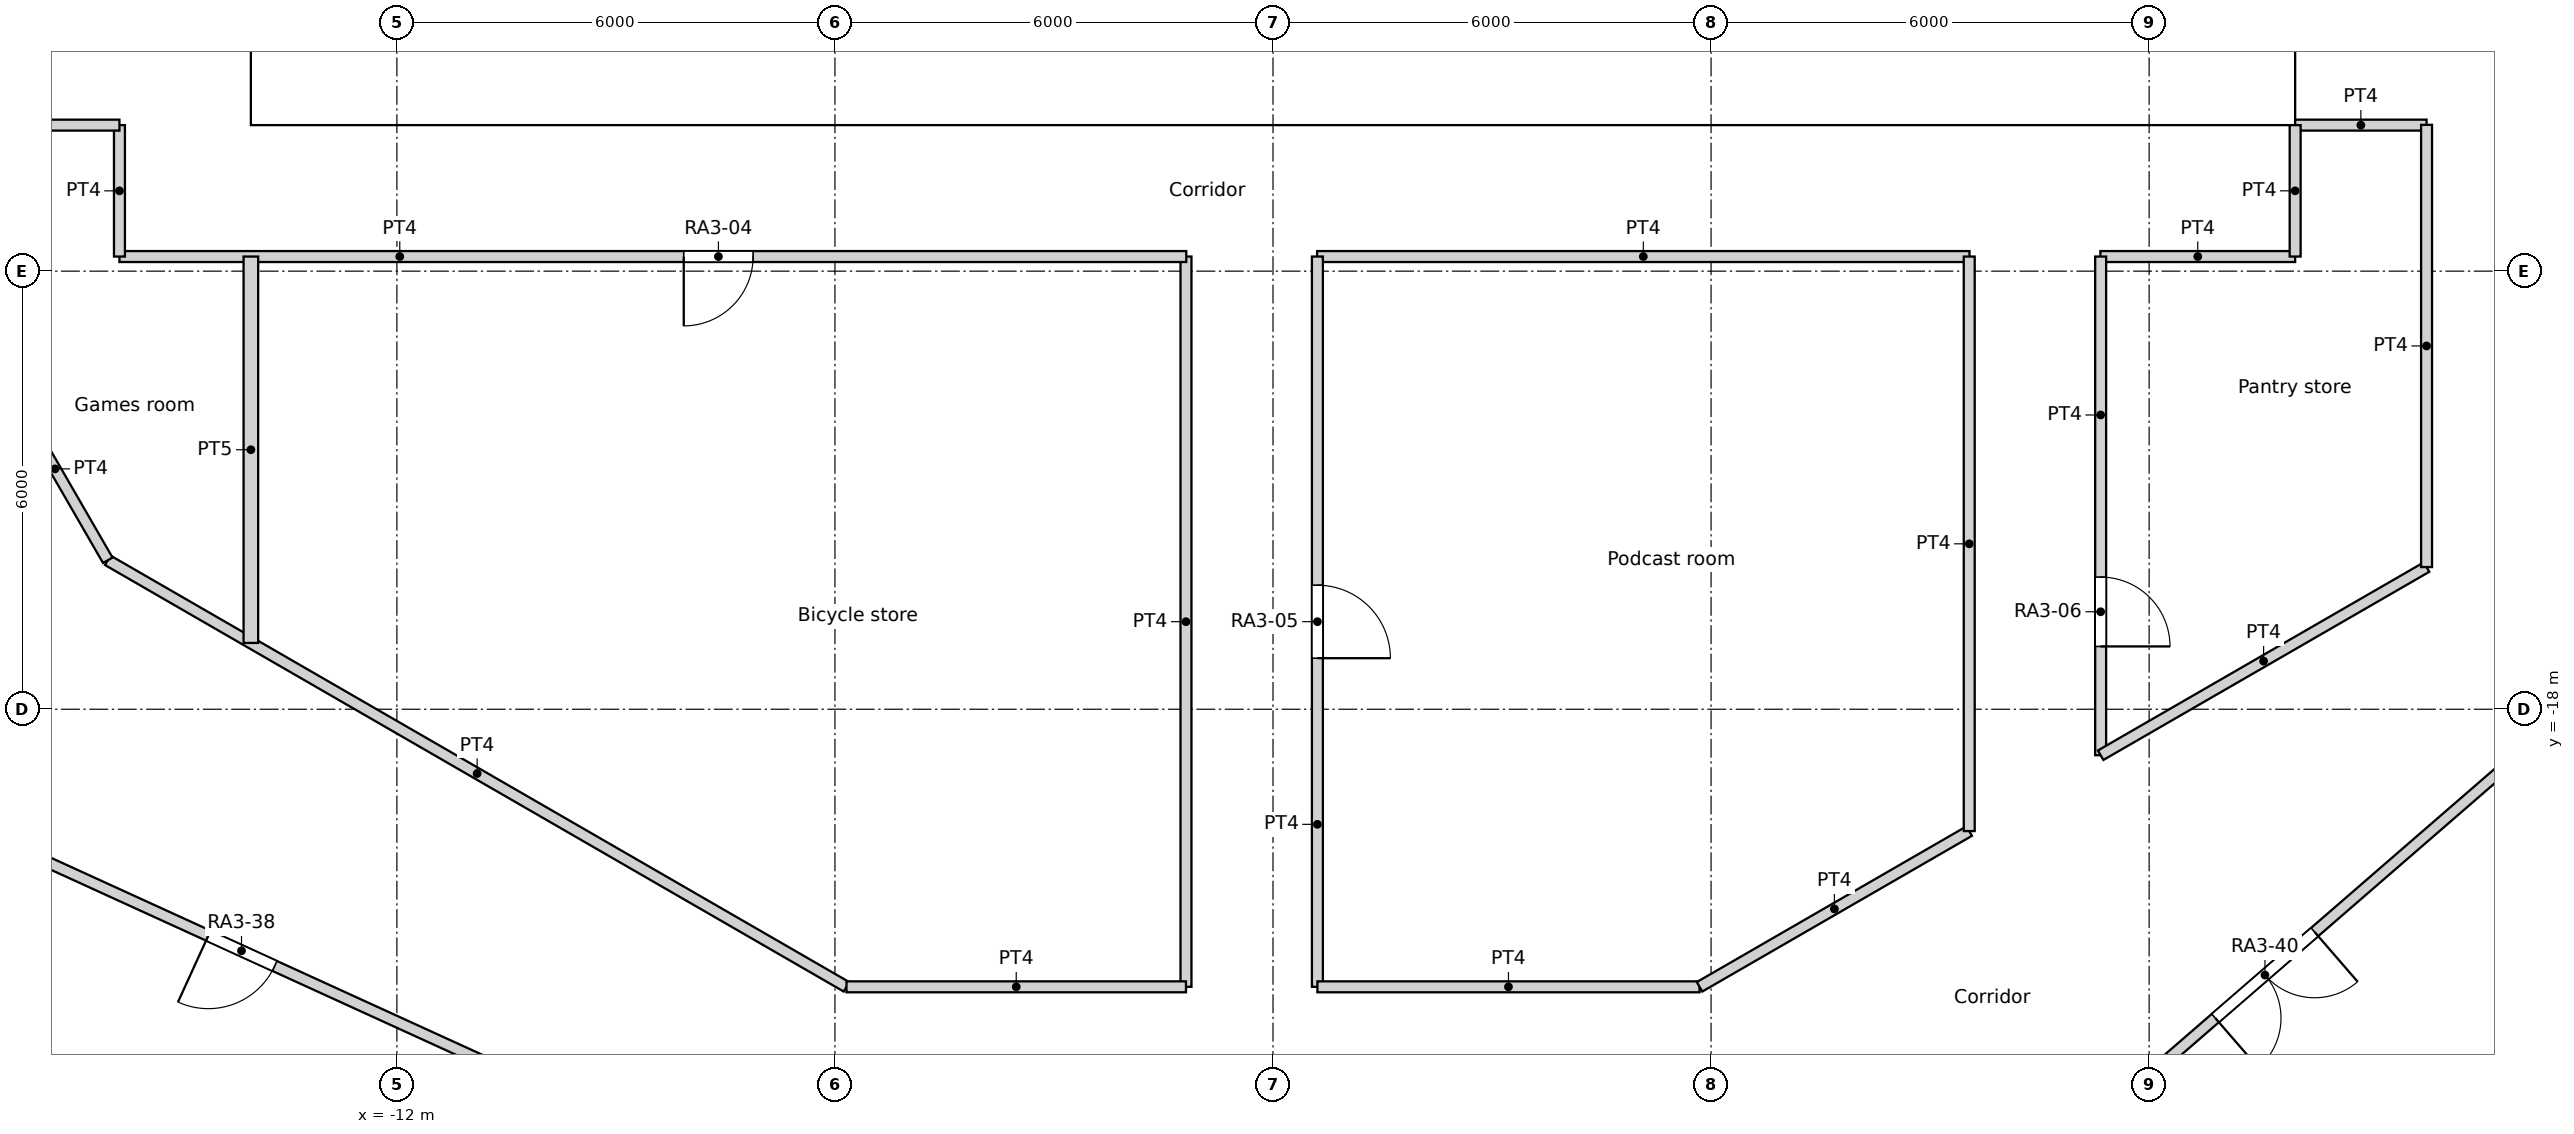
"""IFC4 building model, lengths in metres.
Left out: names, types, materials, properties, quantities, classifications, styles, units other than length and angle.
Written with IfcOpenShell. Run it as: python <this file> out.ifc"""

import sys

from ifc_helpers import new_model, si_unit, direction, frame, frame_2d, origin, origin_2d, place, context, subcontext, project, spatial, rectangle, circle, extrude, element, fill, save


model = new_model("IFC4")
c1 = context("Model", 3, precision=1e-05, world=origin(), true_north=direction((0.0, 1.0)))
c2 = subcontext(c1, "Body", "Model", "MODEL_VIEW")
j1 = project(units=[si_unit("LENGTHUNIT", "METRE"), si_unit("PLANEANGLEUNIT", "RADIAN")], contexts=[c1])
p1 = place(None, origin())
s1 = spatial("IfcSite", under=j1, at=p1, CompositionType="ELEMENT")
p2 = place(p1, origin())
s2 = spatial("IfcBuilding", under=s1, at=p2, CompositionType="ELEMENT")
p3 = place(p2, frame((0.0, 0.0, 49.8)))
s3 = spatial("IfcBuildingStorey", under=s2, at=p3, CompositionType="ELEMENT", Elevation=49.8)
for number, where, z_axis, x_axis in (
    (1, (-16.846, -17.855, 0.0), (0.0, 0.0, 1.0), (1.0, 0.0, 0.0)),
    (2, (-12.274, -21.259, 0.0), (0.0, 0.0, 1.0), (1.0, 0.0, 0.0)),
    (3, (9.723, -22.54, 0.0), (0.0, 0.0, 1.0), (1.0, 0.0, 0.0)),
    (4, (14.659, -19.69, 0.0), (0.0, 0.0, 1.0), (1.0, 0.0, 0.0)),
):
    element("IfcColumn", number, at=place(p3, frame(where, z_axis=z_axis, x_axis=x_axis)), inside=s3, PredefinedType="COLUMN", context=c2, shape_type="SweptSolid", body=[
        extrude(circle(Radius=0.75, at=origin_2d()), origin(), (0.0, 0.0, 1.0), 3.6),
    ])
for number, where, z_axis, x_axis in (
    (5, (-13.798, -12.802, 0.0), (0.0, 0.0, 1.0), (1.0, 0.0, 0.0)),
    (6, (-9.411, -16.301, 0.0), (0.0, 0.0, 1.0), (1.0, 0.0, 0.0)),
    (7, (-4.188, -18.35, 0.0), (0.0, 0.0, 1.0), (1.0, 0.0, 0.0)),
    (8, (1.406, -18.77, 0.0), (0.0, 0.0, 1.0), (1.0, 0.0, 0.0)),
    (9, (6.876, -17.521, 0.0), (0.0, 0.0, 1.0), (1.0, 0.0, 0.0)),
    (10, (11.735, -14.716, 0.0), (0.0, 0.0, 1.0), (1.0, 0.0, 0.0)),
    (11, (15.552, -10.603, 0.0), (0.0, 0.0, 1.0), (1.0, 0.0, 0.0)),
):
    element("IfcColumn", number, at=place(p3, frame(where, z_axis=z_axis, x_axis=x_axis)), inside=s3, PredefinedType="COLUMN", context=c2, shape_type="SweptSolid", body=[
        extrude(circle(Radius=0.8, at=origin_2d()), origin(), (0.0, 0.0, 1.0), 3.6),
    ])
p4 = place(p3, frame((-14.0, -9.4, 0.0), z_axis=(0.0, 0.0, 1.0), x_axis=(1.0, 0.0, 0.0)))
e12 = element("IfcWall", 12, at=p4, inside=s3, PredefinedType="SOLIDWALL", context=c2, shape_type="SweptSolid", body=[
    extrude(rectangle(XDim=28.0, YDim=1.2, at=frame_2d((14.0, 0.0))), origin(), (0.0, 0.0, 1.0), 3.6),
])
p5 = place(p4, frame((14.9, 0.0, 0.0)))
e13 = element("IfcOpeningElement", 13, at=p5, cuts=e12, PredefinedType="OPENING", context=c2, shape_type="SweptSolid", body=[
    extrude(rectangle(XDim=1.0, YDim=2.1, at=frame_2d((0.5, 1.05))), frame((0.0, 0.6, 0.0), z_axis=(0.0, -1.0, 0.0), x_axis=(1.0, 0.0, 0.0)), (0.0, 0.0, 1.0), 1.2),
])
p6 = place(p4, frame((9.8, 0.0, 0.0)))
e14 = element("IfcOpeningElement", 14, at=p6, cuts=e12, PredefinedType="OPENING", context=c2, shape_type="SweptSolid", body=[
    extrude(rectangle(XDim=1.8, YDim=2.1, at=frame_2d((0.9, 1.05))), frame((0.0, 0.6, 0.0), z_axis=(0.0, -1.0, 0.0), x_axis=(1.0, 0.0, 0.0)), (0.0, 0.0, 1.0), 1.2),
])
p7 = place(p4, frame((16.4, 0.0, 0.0)))
e15 = element("IfcOpeningElement", 15, at=p7, cuts=e12, PredefinedType="OPENING", context=c2, shape_type="SweptSolid", body=[
    extrude(rectangle(XDim=1.8, YDim=2.1, at=frame_2d((0.9, 1.05))), frame((0.0, 0.6, 0.0), z_axis=(0.0, -1.0, 0.0), x_axis=(1.0, 0.0, 0.0)), (0.0, 0.0, 1.0), 1.2),
])
p8 = place(p3, frame((-15.8, -11.8, 0.0), z_axis=(0.0, 0.0, 1.0), x_axis=(1.0, 0.0, 0.0)))
e16 = element("IfcWall", 16, at=p8, inside=s3, PredefinedType="PARTITIONING", context=c2, shape_type="SweptSolid", body=[
    extrude(rectangle(XDim=14.612, YDim=0.15, at=frame_2d((7.306, 0.0))), origin(), (0.0, 0.0, 1.0), 3.15),
])
p9 = place(p8, frame((7.729, 0.0, 0.0)))
e17 = element("IfcOpeningElement", 17, at=p9, cuts=e16, PredefinedType="OPENING", context=c2, shape_type="SweptSolid", body=[
    extrude(rectangle(XDim=0.95, YDim=2.1, at=frame_2d((0.475, 1.05))), frame((0.0, 0.075, 0.0), z_axis=(0.0, -1.0, 0.0), x_axis=(1.0, 0.0, 0.0)), (0.0, 0.0, 1.0), 0.15),
])
p10 = place(p3, frame((0.604, -11.8, 0.0), z_axis=(0.0, 0.0, 1.0), x_axis=(1.0, 0.0, 0.0)))
e18 = element("IfcWall", 18, at=p10, inside=s3, PredefinedType="PARTITIONING", context=c2, shape_type="SweptSolid", body=[
    extrude(rectangle(XDim=8.936, YDim=0.15, at=frame_2d((4.468, 0.0))), origin(), (0.0, 0.0, 1.0), 3.15),
])
p11 = place(p3, frame((14.0, -11.8, 0.0), z_axis=(0.0, 0.0, 1.0), x_axis=(0.0, 1.0, 0.0)))
e19 = element("IfcWall", 19, at=p11, inside=s3, PredefinedType="PARTITIONING", context=c2, shape_type="SweptSolid", body=[
    extrude(rectangle(XDim=1.8, YDim=0.15, at=frame_2d((0.9, 0.0))), origin(), (0.0, 0.0, 1.0), 3.15),
])
p12 = place(p3, frame((11.332, -11.8, 0.0), z_axis=(0.0, 0.0, 1.0), x_axis=(1.0, 0.0, 0.0)))
e20 = element("IfcWall", 20, at=p12, inside=s3, PredefinedType="PARTITIONING", context=c2, shape_type="SweptSolid", body=[
    extrude(rectangle(XDim=2.668, YDim=0.15, at=frame_2d((1.334, 0.0))), origin(), (0.0, 0.0, 1.0), 3.15),
])
for number, where, z_axis, x_axis in (
    (21, (-15.8, -11.8, 0.0), (0.0, 0.0, 1.0), (0.0, 1.0, 0.0)),
    (22, (14.0, -10.0, 0.0), (0.0, 0.0, 1.0), (1.0, 0.0, 0.0)),
):
    element("IfcWall", number, at=place(p3, frame(where, z_axis=z_axis, x_axis=x_axis)), inside=s3, PredefinedType="PARTITIONING", context=c2, shape_type="SweptSolid", body=[
        extrude(rectangle(XDim=1.8, YDim=0.15, at=frame_2d((0.9, 0.0))), origin(), (0.0, 0.0, 1.0), 3.15),
    ])
p13 = place(p3, frame((15.8, -16.053, 0.0), z_axis=(0.0, 0.0, 1.0), x_axis=(0.0, 1.0, 0.0)))
e23 = element("IfcWall", 23, at=p13, inside=s3, PredefinedType="PARTITIONING", context=c2, shape_type="SweptSolid", body=[
    extrude(rectangle(XDim=6.057, YDim=0.15, at=frame_2d((3.028, 0.0))), origin(), (0.0, 0.0, 1.0), 3.15),
])
p14 = place(p3, frame((10.933, -23.94, 0.0), z_axis=(0.0, 0.0, 1.0), x_axis=(0.755770011705, 0.654837147242, 0.0)))
e24 = element("IfcWall", 24, at=p14, inside=s3, PredefinedType="PARTITIONING", context=c2, shape_type="SweptSolid", body=[
    extrude(rectangle(XDim=14.83, YDim=0.15, at=frame_2d((7.415, 0.0))), origin(), (0.0, 0.0, 1.0), 3.15),
])
p15 = place(p14, frame((2.611, 0.0, 0.0)))
e25 = element("IfcOpeningElement", 25, at=p15, cuts=e24, PredefinedType="OPENING", context=c2, shape_type="SweptSolid", body=[
    extrude(rectangle(XDim=1.8, YDim=2.1, at=frame_2d((0.9, 1.05))), frame((0.0, 0.075, 0.0), z_axis=(0.0, -1.0, 0.0), x_axis=(1.0, 0.0, 0.0)), (0.0, 0.0, 1.0), 0.15),
])
p16 = place(p3, frame((-19.401, -10.0, 0.0), z_axis=(0.0, 0.0, 1.0), x_axis=(1.0, 0.0, 0.0)))
e26 = element("IfcWall", 26, at=p16, inside=s3, PredefinedType="PARTITIONING", context=c2, shape_type="SweptSolid", body=[
    extrude(rectangle(XDim=3.601, YDim=0.15, at=frame_2d((1.8, 0.0))), origin(), (0.0, 0.0, 1.0), 3.15),
])
p17 = place(p3, frame((-19.401, -10.0, 0.0), z_axis=(0.0, 0.0, 1.0), x_axis=(0.499992689227, -0.86602962462, 0.0)))
e27 = element("IfcWall", 27, at=p17, inside=s3, PredefinedType="PARTITIONING", context=c2, shape_type="SweptSolid", body=[
    extrude(rectangle(XDim=6.882, YDim=0.15, at=frame_2d((3.441, 0.0))), origin(), (0.0, 0.0, 1.0), 3.15),
])
p18 = place(p17, frame((2.941, 0.0, 0.0)))
e28 = element("IfcOpeningElement", 28, at=p18, cuts=e27, PredefinedType="OPENING", context=c2, shape_type="SweptSolid", body=[
    extrude(rectangle(XDim=1.0, YDim=2.04, at=frame_2d((0.5, 1.02))), frame((0.0, 0.075, 0.0), z_axis=(0.0, -1.0, 0.0), x_axis=(1.0, 0.0, 0.0)), (0.0, 0.0, 1.0), 0.15),
])
p19 = place(p3, frame((-15.96, -15.96, 0.0), z_axis=(0.0, 0.0, 1.0), x_axis=(0.866022730501, -0.500004630234, 0.0)))
e29 = element("IfcWall", 29, at=p19, inside=s3, PredefinedType="PARTITIONING", context=c2, shape_type="SweptSolid", body=[
    extrude(rectangle(XDim=11.684, YDim=0.15, at=frame_2d((5.842, 0.0))), origin(), (0.0, 0.0, 1.0), 3.15),
])
p20 = place(p3, frame((-5.842, -21.802, 0.0), z_axis=(0.0, 0.0, 1.0), x_axis=(1.0, 0.0, 0.0)))
e30 = element("IfcWall", 30, at=p20, inside=s3, PredefinedType="PARTITIONING", context=c2, shape_type="SweptSolid", body=[
    extrude(rectangle(XDim=4.65, YDim=0.15, at=frame_2d((2.325, 0.0))), origin(), (0.0, 0.0, 1.0), 3.15),
])
p21 = place(p3, frame((-1.192, -21.802, 0.0), z_axis=(0.0, 0.0, 1.0), x_axis=(0.0, 1.0, 0.0)))
e31 = element("IfcWall", 31, at=p21, inside=s3, PredefinedType="PARTITIONING", context=c2, shape_type="SweptSolid", body=[
    extrude(rectangle(XDim=10.002, YDim=0.15, at=frame_2d((5.001, 0.0))), origin(), (0.0, 0.0, 1.0), 3.15),
])
p22 = place(p3, frame((0.608, -21.802, 0.0), z_axis=(0.0, 0.0, 1.0), x_axis=(0.0, 1.0, 0.0)))
e32 = element("IfcWall", 32, at=p22, inside=s3, PredefinedType="PARTITIONING", context=c2, shape_type="SweptSolid", body=[
    extrude(rectangle(XDim=10.002, YDim=0.15, at=frame_2d((5.001, 0.0))), origin(), (0.0, 0.0, 1.0), 3.15),
])
p23 = place(p22, frame((4.501, 0.0, 0.0)))
e33 = element("IfcOpeningElement", 33, at=p23, cuts=e32, PredefinedType="OPENING", context=c2, shape_type="SweptSolid", body=[
    extrude(rectangle(XDim=1.0, YDim=2.04, at=frame_2d((0.5, 1.02))), frame((0.0, 0.075, 0.0), z_axis=(0.0, -1.0, 0.0), x_axis=(1.0, 0.0, 0.0)), (0.0, 0.0, 1.0), 0.15),
])
p24 = place(p3, frame((0.608, -21.802, 0.0), z_axis=(0.0, 0.0, 1.0), x_axis=(1.0, 0.0, 0.0)))
e34 = element("IfcWall", 34, at=p24, inside=s3, PredefinedType="PARTITIONING", context=c2, shape_type="SweptSolid", body=[
    extrude(rectangle(XDim=5.234, YDim=0.15, at=frame_2d((2.617, 0.0))), origin(), (0.0, 0.0, 1.0), 3.15),
])
p25 = place(p3, frame((5.842, -21.802, 0.0), z_axis=(0.0, 0.0, 1.0), x_axis=(0.865983505205, 0.500072563448, 0.0)))
e35 = element("IfcWall", 35, at=p25, inside=s3, PredefinedType="PARTITIONING", context=c2, shape_type="SweptSolid", body=[
    extrude(rectangle(XDim=4.265, YDim=0.15, at=frame_2d((2.133, 0.0))), origin(), (0.0, 0.0, 1.0), 3.15),
])
p26 = place(p3, frame((9.536, -19.669, 0.0), z_axis=(0.0, 0.0, 1.0), x_axis=(0.0, 1.0, 0.0)))
e36 = element("IfcWall", 36, at=p26, inside=s3, PredefinedType="PARTITIONING", context=c2, shape_type="SweptSolid", body=[
    extrude(rectangle(XDim=7.869, YDim=0.15, at=frame_2d((3.935, 0.0))), origin(), (0.0, 0.0, 1.0), 3.15),
])
p27 = place(p3, frame((11.336, -18.63, 0.0), z_axis=(0.0, 0.0, 1.0), x_axis=(0.0, 1.0, 0.0)))
e37 = element("IfcWall", 37, at=p27, inside=s3, PredefinedType="PARTITIONING", context=c2, shape_type="SweptSolid", body=[
    extrude(rectangle(XDim=6.83, YDim=0.15, at=frame_2d((3.415, 0.0))), origin(), (0.0, 0.0, 1.0), 3.15),
])
p28 = place(p27, frame((1.49, 0.0, 0.0)))
e38 = element("IfcOpeningElement", 38, at=p28, cuts=e37, PredefinedType="OPENING", context=c2, shape_type="SweptSolid", body=[
    extrude(rectangle(XDim=0.95, YDim=2.1, at=frame_2d((0.475, 1.05))), frame((0.0, 0.075, 0.0), z_axis=(0.0, -1.0, 0.0), x_axis=(1.0, 0.0, 0.0)), (0.0, 0.0, 1.0), 0.15),
])
p29 = place(p3, frame((11.336, -18.63, 0.0), z_axis=(0.0, 0.0, 1.0), x_axis=(0.866063337164, 0.499934291702, 0.0)))
e39 = element("IfcWall", 39, at=p29, inside=s3, PredefinedType="PARTITIONING", context=c2, shape_type="SweptSolid", body=[
    extrude(rectangle(XDim=5.155, YDim=0.15, at=frame_2d((2.577, 0.0))), origin(), (0.0, 0.0, 1.0), 3.15),
])
p30 = place(p3, frame((-17.235, -19.89, 0.0), z_axis=(0.0, 0.0, 1.0), x_axis=(0.909617953634, -0.415445758705, 0.0)))
e40 = element("IfcWall", 40, at=p30, inside=s3, PredefinedType="PARTITIONING", context=c2, shape_type="SweptSolid", body=[
    extrude(rectangle(XDim=14.83, YDim=0.15, at=frame_2d((7.415, 0.0))), origin(), (0.0, 0.0, 1.0), 3.15),
])
p31 = place(p30, frame((2.916, 0.0, 0.0)))
e41 = element("IfcOpeningElement", 41, at=p31, cuts=e40, PredefinedType="OPENING", context=c2, shape_type="SweptSolid", body=[
    extrude(rectangle(XDim=1.0, YDim=2.04, at=frame_2d((0.5, 1.02))), frame((0.0, 0.075, 0.0), z_axis=(0.0, -1.0, 0.0), x_axis=(1.0, 0.0, 0.0)), (0.0, 0.0, 1.0), 0.15),
])
p32 = place(p3, frame((-14.0, -17.092, 0.0), z_axis=(0.0, 0.0, 1.0), x_axis=(0.0, 1.0, 0.0)))
e42 = element("IfcWall", 42, at=p32, inside=s3, PredefinedType="PARTITIONING", context=c2, shape_type="SweptSolid", body=[
    extrude(rectangle(XDim=5.292, YDim=0.2, at=frame_2d((2.646, 0.0))), origin(), (0.0, 0.0, 1.0), 3.15),
])
p33 = place(p5, origin())
e43 = element("IfcDoor", 43, at=p33, inside=s3, OperationType="SINGLE_SWING_LEFT", PredefinedType="DOOR", context=c2, shape_type="SweptSolid", body=[
    extrude(rectangle(XDim=1.0, YDim=2.1, at=frame_2d((0.5, 1.05))), frame((0.0, 0.025, 0.0), z_axis=(0.0, -1.0, 0.0), x_axis=(1.0, 0.0, 0.0)), (0.0, 0.0, 1.0), 0.05),
])
fill(e13, e43)
p34 = place(p6, origin())
e44 = element("IfcDoor", 44, at=p34, inside=s3, OperationType="DOUBLE_DOOR_SINGLE_SWING", PredefinedType="DOOR", context=c2, shape_type="SweptSolid", body=[
    extrude(rectangle(XDim=1.8, YDim=2.1, at=frame_2d((0.9, 1.05))), frame((0.0, 0.025, 0.0), z_axis=(0.0, -1.0, 0.0), x_axis=(1.0, 0.0, 0.0)), (0.0, 0.0, 1.0), 0.05),
])
fill(e14, e44)
p35 = place(p7, origin())
e45 = element("IfcDoor", 45, at=p35, inside=s3, OperationType="DOUBLE_DOOR_SINGLE_SWING", PredefinedType="DOOR", context=c2, shape_type="SweptSolid", body=[
    extrude(rectangle(XDim=1.8, YDim=2.1, at=frame_2d((0.9, 1.05))), frame((0.0, 0.025, 0.0), z_axis=(0.0, -1.0, 0.0), x_axis=(1.0, 0.0, 0.0)), (0.0, 0.0, 1.0), 0.05),
])
fill(e15, e45)
p36 = place(p9, origin())
e46 = element("IfcDoor", 46, at=p36, inside=s3, OperationType="SINGLE_SWING_RIGHT", PredefinedType="DOOR", context=c2, shape_type="SweptSolid", body=[
    extrude(rectangle(XDim=0.95, YDim=2.1, at=frame_2d((0.475, 1.05))), frame((0.0, 0.025, 0.0), z_axis=(0.0, -1.0, 0.0), x_axis=(1.0, 0.0, 0.0)), (0.0, 0.0, 1.0), 0.05),
])
fill(e17, e46)
p37 = place(p23, origin())
e47 = element("IfcDoor", 47, at=p37, inside=s3, OperationType="SINGLE_SWING_RIGHT", PredefinedType="DOOR", context=c2, shape_type="SweptSolid", body=[
    extrude(rectangle(XDim=1.0, YDim=2.04, at=frame_2d((0.5, 1.02))), frame((0.0, 0.025, 0.0), z_axis=(0.0, -1.0, 0.0), x_axis=(1.0, 0.0, 0.0)), (0.0, 0.0, 1.0), 0.05),
])
fill(e33, e47)
p38 = place(p28, origin())
e48 = element("IfcDoor", 48, at=p38, inside=s3, OperationType="SINGLE_SWING_RIGHT", PredefinedType="DOOR", context=c2, shape_type="SweptSolid", body=[
    extrude(rectangle(XDim=0.95, YDim=2.1, at=frame_2d((0.475, 1.05))), frame((0.0, 0.025, 0.0), z_axis=(0.0, -1.0, 0.0), x_axis=(1.0, 0.0, 0.0)), (0.0, 0.0, 1.0), 0.05),
])
fill(e38, e48)
p39 = place(p31, origin())
e49 = element("IfcDoor", 49, at=p39, inside=s3, OperationType="SINGLE_SWING_RIGHT", PredefinedType="DOOR", context=c2, shape_type="SweptSolid", body=[
    extrude(rectangle(XDim=1.0, YDim=2.04, at=frame_2d((0.5, 1.02))), frame((0.0, 0.025, 0.0), z_axis=(0.0, -1.0, 0.0), x_axis=(1.0, 0.0, 0.0)), (0.0, 0.0, 1.0), 0.05),
])
fill(e41, e49)
p40 = place(p15, origin())
e50 = element("IfcDoor", 50, at=p40, inside=s3, OperationType="DOUBLE_DOOR_SINGLE_SWING", PredefinedType="DOOR", context=c2, shape_type="SweptSolid", body=[
    extrude(rectangle(XDim=1.8, YDim=2.1, at=frame_2d((0.9, 1.05))), frame((0.0, 0.025, 0.0), z_axis=(0.0, -1.0, 0.0), x_axis=(1.0, 0.0, 0.0)), (0.0, 0.0, 1.0), 0.05),
])
fill(e25, e50)
save(model, sys.argv[1])
